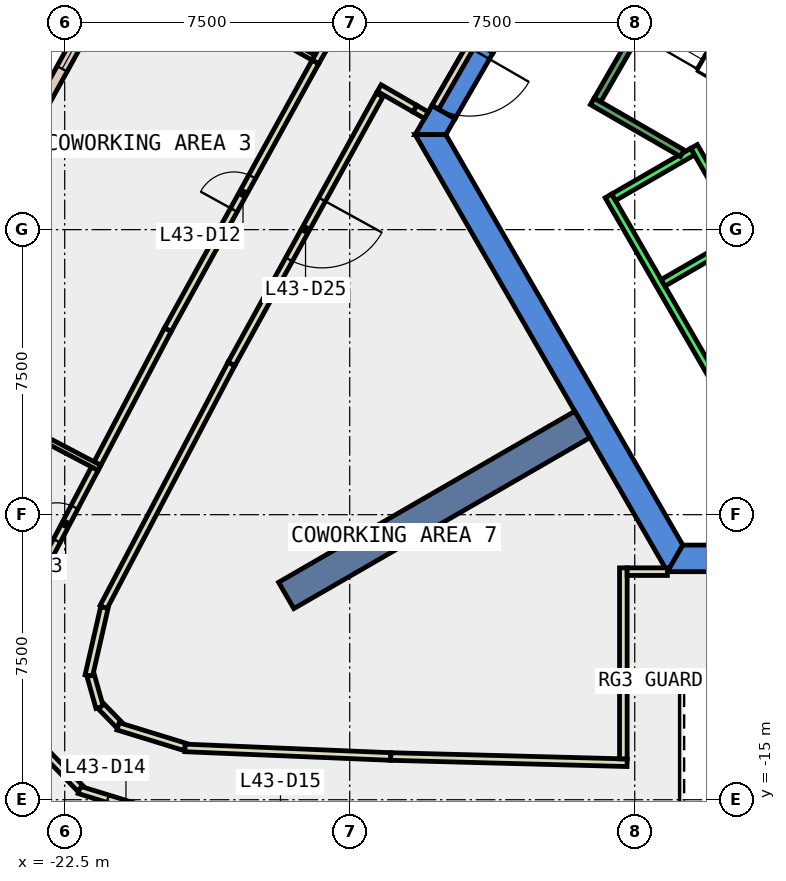
"""IFC4 building model, lengths in metres.
Left out: names, types, materials, properties, quantities, classifications, styles, units other than length and angle.
Written with IfcOpenShell. Run it as: python <this file> out.ifc"""

import sys

from ifc_helpers import new_model, si_unit, direction, frame, frame_2d, origin, place, context, subcontext, project, spatial, polyline, rectangle, outline, extrude, element, fill, save


model = new_model("IFC4")
c1 = context("Model", 3, precision=1e-05, world=origin(), true_north=direction((0.0, 1.0)))
c2 = subcontext(c1, "Body", "Model", "MODEL_VIEW")
j1 = project(units=[si_unit("LENGTHUNIT", "METRE"), si_unit("PLANEANGLEUNIT", "RADIAN")], contexts=[c1])
p1 = place(None, origin())
s1 = spatial("IfcSite", under=j1, at=p1, CompositionType="ELEMENT")
p2 = place(p1, origin())
s2 = spatial("IfcBuilding", under=s1, at=p2, CompositionType="ELEMENT")
p3 = place(p2, frame((0.0, 0.0, 194.0)))
s3 = spatial("IfcBuildingStorey", under=s2, at=p3, CompositionType="ELEMENT", Elevation=194.0)
p4 = place(p3, frame((0.0, 0.0, -0.4)))
e1 = element("IfcWall", 1, at=p4, inside=s3, PredefinedType="SHEAR", context=c2, shape_type="SweptSolid", body=[
    extrude(outline(polyline([(-11.834, 5.002), (-11.228, 4.652), (-6.235, 13.3), (-6.64, 14.0), (-11.834, 5.002)])), origin(), (0.0, 0.0, 1.0), 4.2),
])
p5 = place(p3, frame((0.0, 0.0, -0.4)))
e2 = element("IfcWall", 2, at=p5, inside=s3, PredefinedType="SHEAR", context=c2, shape_type="SweptSolid", body=[
    extrude(outline(polyline([(-12.228, 2.92), (-12.834, 3.27), (-13.279, 2.5), (-12.471, 2.5), (-12.228, 2.92)])), origin(), (0.0, 0.0, 1.0), 4.2),
])
p6 = place(p3, frame((0.0, 0.0, 3.6)))
e3 = element("IfcWall", 3, at=p6, inside=s3, PredefinedType="SHEAR", context=c2, shape_type="SweptSolid", body=[
    extrude(outline(polyline([(-12.834, 3.27), (-12.228, 2.92), (-11.228, 4.652), (-11.834, 5.002), (-12.834, 3.27)])), origin(), (0.0, 0.0, 1.0), 0.2),
])
p7 = place(p3, frame((0.0, 0.0, -0.4)))
e4 = element("IfcWall", 4, at=p7, inside=s3, PredefinedType="SHEAR", context=c2, shape_type="SweptSolid", body=[
    extrude(outline(polyline([(-13.279, 2.5), (-6.64, -9.0), (-6.235, -8.3), (-12.471, 2.5), (-13.279, 2.5)])), origin(), (0.0, 0.0, 1.0), 4.2),
])
p8 = place(p3, frame((0.0, 0.0, -0.4)))
e5 = element("IfcWall", 5, at=p8, inside=s3, PredefinedType="SHEAR", context=c2, shape_type="SweptSolid", body=[
    extrude(outline(polyline([(3.75, -9.0), (3.75, -8.3), (-6.235, -8.3), (-6.64, -9.0), (3.75, -9.0)])), origin(), (0.0, 0.0, 1.0), 4.2),
])
p9 = place(p3, frame((-8.877, -5.125, -0.4), z_axis=(0.0, 0.0, 1.0), x_axis=(-0.866017533419, -0.500013631625, 0.0)))
e6 = element("IfcWall", 6, at=p9, inside=s3, PredefinedType="SHEAR", context=c2, shape_type="SweptSolid", body=[
    extrude(rectangle(XDim=9.0, YDim=0.8, at=frame_2d((4.5, 0.0))), origin(), (0.0, 0.0, 1.0), 4.2),
])
p10 = place(p3, frame((-21.116, 6.865, 0.0), z_axis=(0.0, 0.0, 1.0), x_axis=(-0.482862185961, -0.875696356832, 0.0)))
e7 = element("IfcWall", 7, at=p10, inside=s3, PredefinedType="STANDARD", context=c2, shape_type="SweptSolid", body=[
    extrude(rectangle(XDim=7.23, YDim=0.3, at=frame_2d((3.615, 0.0))), origin(), (0.0, 0.0, 1.0), 3.8),
])
p11 = place(p10, frame((0.607, 0.0, 0.9)))
e8 = element("IfcOpeningElement", 8, at=p11, cuts=e7, PredefinedType="OPENING", context=c2, shape_type="SweptSolid", body=[
    extrude(rectangle(XDim=2.4, YDim=2.6, at=frame_2d((1.2, 1.3))), frame((0.0, 0.16, 0.0), z_axis=(0.0, -1.0, 0.0), x_axis=(1.0, 0.0, 0.0)), (0.0, 0.0, 1.0), 0.32),
])
p12 = place(p10, frame((4.222, 0.0, 0.9)))
e9 = element("IfcOpeningElement", 9, at=p12, cuts=e7, PredefinedType="OPENING", context=c2, shape_type="SweptSolid", body=[
    extrude(rectangle(XDim=2.4, YDim=2.6, at=frame_2d((1.2, 1.3))), frame((0.0, 0.16, 0.0), z_axis=(0.0, -1.0, 0.0), x_axis=(1.0, 0.0, 0.0)), (0.0, 0.0, 1.0), 0.32),
])
p13 = place(p3, frame((-18.112, -3.531, 0.0), z_axis=(0.0, 0.0, 1.0), x_axis=(-0.465461327558, -0.885068219149, 0.0)))
e10 = element("IfcWall", 10, at=p13, inside=s3, PredefinedType="PARTITIONING", context=c2, shape_type="SweptSolid", body=[
    extrude(rectangle(XDim=7.236, YDim=0.2, at=frame_2d((3.618, 0.0))), origin(), (0.0, 0.0, 1.0), 3.8),
])
p14 = place(p3, frame((-21.456, -9.944, 0.0), z_axis=(0.0, 0.0, 1.0), x_axis=(-0.222871656966, -0.974847795567, 0.0)))
e11 = element("IfcWall", 11, at=p14, inside=s3, PredefinedType="PARTITIONING", context=c2, shape_type="SweptSolid", body=[
    extrude(rectangle(XDim=1.839, YDim=0.2, at=frame_2d((0.919, 0.0))), origin(), (0.0, 0.0, 1.0), 3.8),
])
p15 = place(p3, frame((-21.816, -11.735, 0.0), z_axis=(0.0, 0.0, 1.0), x_axis=(0.270192443589, -0.962806337447, 0.0)))
e12 = element("IfcWall", 12, at=p15, inside=s3, PredefinedType="PARTITIONING", context=c2, shape_type="SweptSolid", body=[
    extrude(rectangle(XDim=0.869, YDim=0.2, at=frame_2d((0.435, 0.0))), origin(), (0.0, 0.0, 1.0), 3.8),
])
p16 = place(p3, frame((-21.538, -12.547, 0.0), z_axis=(0.0, 0.0, 1.0), x_axis=(0.697542638825, -0.716543276446, 0.0)))
e13 = element("IfcWall", 13, at=p16, inside=s3, PredefinedType="PARTITIONING", context=c2, shape_type="SweptSolid", body=[
    extrude(rectangle(XDim=0.668, YDim=0.2, at=frame_2d((0.334, 0.0))), origin(), (0.0, 0.0, 1.0), 3.8),
])
p17 = place(p3, frame((-21.097, -13.068, 0.0), z_axis=(0.0, 0.0, 1.0), x_axis=(0.955790442908, -0.294048685161, 0.0)))
e14 = element("IfcWall", 14, at=p17, inside=s3, PredefinedType="PARTITIONING", context=c2, shape_type="SweptSolid", body=[
    extrude(rectangle(XDim=1.846, YDim=0.2, at=frame_2d((0.923, 0.0))), origin(), (0.0, 0.0, 1.0), 3.8),
])
p18 = place(p3, frame((-19.336, -13.637, 0.0), z_axis=(0.0, 0.0, 1.0), x_axis=(0.999130261307, -0.041697972867, 0.0)))
e15 = element("IfcWall", 15, at=p18, inside=s3, PredefinedType="PARTITIONING", context=c2, shape_type="SweptSolid", body=[
    extrude(rectangle(XDim=5.422, YDim=0.2, at=frame_2d((2.711, 0.0))), origin(), (0.0, 0.0, 1.0), 3.8),
])
p19 = place(p3, frame((-13.919, -13.863, 0.0), z_axis=(0.0, 0.0, 1.0), x_axis=(0.999652206272, -0.026371698764, 0.0)))
e16 = element("IfcWall", 16, at=p19, inside=s3, PredefinedType="PARTITIONING", context=c2, shape_type="SweptSolid", body=[
    extrude(rectangle(XDim=6.221, YDim=0.2, at=frame_2d((3.111, 0.0))), origin(), (0.0, 0.0, 1.0), 3.8),
])
p20 = place(p3, frame((-12.984, 3.01, 0.0), z_axis=(0.0, 0.0, 1.0), x_axis=(-0.866046247233, 0.49996389635, 0.0)))
e17 = element("IfcWall", 17, at=p20, inside=s3, PredefinedType="PARTITIONING", context=c2, shape_type="SweptSolid", body=[
    extrude(rectangle(XDim=0.35, YDim=0.2, at=frame_2d((0.175, 0.0))), origin(), (0.0, 0.0, 1.0), 2.4),
])
p21 = place(p3, frame((-14.213, 3.543, 0.0), z_axis=(0.0, 0.0, 1.0), x_axis=(-0.482724934882, -0.875772023556, 0.0)))
e18 = element("IfcWall", 18, at=p21, inside=s3, PredefinedType="PARTITIONING", context=c2, shape_type="SweptSolid", body=[
    extrude(rectangle(XDim=8.077, YDim=0.2, at=frame_2d((4.039, 0.0))), origin(), (0.0, 0.0, 1.0), 3.8),
])
p22 = place(p21, frame((3.139, 0.0, 0.0)))
e19 = element("IfcOpeningElement", 19, at=p22, cuts=e18, PredefinedType="OPENING", context=c2, shape_type="SweptSolid", body=[
    extrude(rectangle(XDim=1.8, YDim=2.1, at=frame_2d((0.9, 1.05))), frame((0.0, 0.11, 0.0), z_axis=(0.0, -1.0, 0.0), x_axis=(1.0, 0.0, 0.0)), (0.0, 0.0, 1.0), 0.22),
])
p23 = place(p3, frame((-15.905, 4.412, 0.0), z_axis=(0.0, 0.0, 1.0), x_axis=(0.5000098125, 0.866019738461, 0.0)))
e20 = element("IfcWall", 20, at=p23, inside=s3, PredefinedType="PARTITIONING", context=c2, shape_type="SweptSolid", body=[
    extrude(rectangle(XDim=8.188, YDim=0.2, at=frame_2d((4.094, 0.0))), origin(), (0.0, 0.0, 1.0), 3.8),
])
p24 = place(p23, frame((3.594, 0.0, 0.0)))
e21 = element("IfcOpeningElement", 21, at=p24, cuts=e20, PredefinedType="OPENING", context=c2, shape_type="SweptSolid", body=[
    extrude(rectangle(XDim=1.0, YDim=2.1, at=frame_2d((0.5, 1.05))), frame((0.0, 0.11, 0.0), z_axis=(0.0, -1.0, 0.0), x_axis=(1.0, 0.0, 0.0)), (0.0, 0.0, 1.0), 0.22),
])
p25 = place(p3, frame((-21.638, -6.154, 0.0), z_axis=(0.0, 0.0, 1.0), x_axis=(0.465392595139, 0.885104362428, 0.0)))
e22 = element("IfcWall", 22, at=p25, inside=s3, PredefinedType="PARTITIONING", context=c2, shape_type="SweptSolid", body=[
    extrude(rectangle(XDim=3.982, YDim=0.2, at=frame_2d((1.991, 0.0))), origin(), (0.0, 0.0, 1.0), 3.8),
])
p26 = place(p3, frame((-19.785, -2.63, 0.0), z_axis=(0.0, 0.0, 1.0), x_axis=(0.482817232578, 0.875721142788, 0.0)))
e23 = element("IfcWall", 23, at=p26, inside=s3, PredefinedType="PARTITIONING", context=c2, shape_type="SweptSolid", body=[
    extrude(rectangle(XDim=8.04, YDim=0.2, at=frame_2d((4.02, 0.0))), origin(), (0.0, 0.0, 1.0), 3.8),
])
p27 = place(p26, frame((3.595, 0.0, 0.0)))
e24 = element("IfcOpeningElement", 24, at=p27, cuts=e23, PredefinedType="OPENING", context=c2, shape_type="SweptSolid", body=[
    extrude(rectangle(XDim=1.0, YDim=2.1, at=frame_2d((0.5, 1.05))), frame((0.0, 0.11, 0.0), z_axis=(0.0, -1.0, 0.0), x_axis=(1.0, 0.0, 0.0)), (0.0, 0.0, 1.0), 0.22),
])
p28 = place(p3, frame((-23.242, -9.204, 0.0), z_axis=(0.0, 0.0, 1.0), x_axis=(0.465431933571, 0.885083676955, 0.0)))
e25 = element("IfcWall", 25, at=p28, inside=s3, PredefinedType="PARTITIONING", context=c2, shape_type="SweptSolid", body=[
    extrude(rectangle(XDim=3.296, YDim=0.2, at=frame_2d((1.648, 0.0))), origin(), (0.0, 0.0, 1.0), 3.8),
])
p29 = place(p28, frame((1.148, 0.0, 0.0)))
e26 = element("IfcOpeningElement", 26, at=p29, cuts=e25, PredefinedType="OPENING", context=c2, shape_type="SweptSolid", body=[
    extrude(rectangle(XDim=1.0, YDim=2.1, at=frame_2d((0.5, 1.05))), frame((0.0, 0.11, 0.0), z_axis=(0.0, -1.0, 0.0), x_axis=(1.0, 0.0, 0.0)), (0.0, 0.0, 1.0), 0.22),
])
p30 = place(p3, frame((-19.657, -15.5, 0.0), z_axis=(0.0, 0.0, 1.0), x_axis=(-0.955612889251, 0.294625195625, 0.0)))
e27 = element("IfcWall", 27, at=p30, inside=s3, PredefinedType="PARTITIONING", context=c2, shape_type="SweptSolid", body=[
    extrude(rectangle(XDim=2.576, YDim=0.2, at=frame_2d((1.288, 0.0))), origin(), (0.0, 0.0, 1.0), 3.8),
])
p31 = place(p30, frame((0.788, 0.0, 0.0)))
e28 = element("IfcOpeningElement", 28, at=p31, cuts=e27, PredefinedType="OPENING", context=c2, shape_type="SweptSolid", body=[
    extrude(rectangle(XDim=1.0, YDim=2.1, at=frame_2d((0.5, 1.05))), frame((0.0, 0.11, 0.0), z_axis=(0.0, -1.0, 0.0), x_axis=(1.0, 0.0, 0.0)), (0.0, 0.0, 1.0), 0.22),
])
p32 = place(p3, frame((-22.093, -14.699, 0.0), z_axis=(0.0, 0.0, 1.0), x_axis=(-0.698551276451, 0.715560000397, 0.0)))
e29 = element("IfcWall", 29, at=p32, inside=s3, PredefinedType="PARTITIONING", context=c2, shape_type="SweptSolid", body=[
    extrude(rectangle(XDim=1.636, YDim=0.2, at=frame_2d((0.818, 0.0))), origin(), (0.0, 0.0, 1.0), 3.8),
])
p33 = place(p3, frame((-7.8, -13.924, 0.0), z_axis=(0.0, 0.0, 1.0), x_axis=(0.0, 1.0, 0.0)))
e30 = element("IfcWall", 30, at=p33, inside=s3, PredefinedType="PARTITIONING", context=c2, shape_type="SweptSolid", body=[
    extrude(rectangle(XDim=5.025, YDim=0.2, at=frame_2d((2.513, 0.0))), origin(), (0.0, 0.0, 1.0), 3.8),
])
p34 = place(p3, frame((-7.7, -8.999, 0.0), z_axis=(0.0, 0.0, 1.0), x_axis=(1.0, 0.0, 0.0)))
e31 = element("IfcWall", 31, at=p34, inside=s3, PredefinedType="PARTITIONING", context=c2, shape_type="SweptSolid", body=[
    extrude(rectangle(XDim=1.059, YDim=0.2, at=frame_2d((0.529, 0.0))), origin(), (0.0, 0.0, 1.0), 3.8),
])
p35 = place(p3, frame((-15.954, 4.526, 0.0), z_axis=(0.0, 0.0, 1.0), x_axis=(-0.870940016277, 0.491389344663, 0.0)))
e32 = element("IfcWall", 32, at=p35, inside=s3, PredefinedType="PARTITIONING", context=c2, shape_type="SweptSolid", body=[
    extrude(rectangle(XDim=4.18, YDim=0.15, at=frame_2d((2.09, 0.0))), origin(), (0.0, 0.0, 1.0), 3.8),
])
p36 = place(p3, frame((-21.585, -6.267, 0.0), z_axis=(0.0, 0.0, 1.0), x_axis=(-0.885073333504, 0.465451602554, 0.0)))
e33 = element("IfcWall", 33, at=p36, inside=s3, PredefinedType="PARTITIONING", context=c2, shape_type="SweptSolid", body=[
    extrude(rectangle(XDim=5.7, YDim=0.15, at=frame_2d((2.85, 0.0))), origin(), (0.0, 0.0, 1.0), 3.8),
])
p37 = place(p3, frame((-11.747, 4.952, 0.0), z_axis=(0.0, 0.0, 1.0), x_axis=(-0.50002537861, -0.866010750942, 0.0)))
e34 = element("IfcWall", 34, at=p37, inside=s3, PredefinedType="PARTITIONING", context=c2, shape_type="SweptSolid", body=[
    extrude(rectangle(XDim=2.0, YDim=0.2, at=frame_2d((1.0, 0.0))), origin(), (0.0, 0.0, 1.0), 2.4),
])
p38 = place(p37, frame((0.19, 0.0, 0.0)))
e35 = element("IfcOpeningElement", 35, at=p38, cuts=e34, PredefinedType="OPENING", context=c2, shape_type="SweptSolid", body=[
    extrude(rectangle(XDim=1.8, YDim=2.1, at=frame_2d((0.9, 1.05))), frame((0.0, 0.11, 0.0), z_axis=(0.0, -1.0, 0.0), x_axis=(1.0, 0.0, 0.0)), (0.0, 0.0, 1.0), 0.22),
])
p39 = place(p3, frame((-13.287, 3.185, 0.0), z_axis=(0.0, 0.0, 1.0), x_axis=(-0.866121626761, 0.499833299868, 0.0)))
e36 = element("IfcWall", 36, at=p39, inside=s3, PredefinedType="PARTITIONING", context=c2, shape_type="SweptSolid", body=[
    extrude(rectangle(XDim=1.08, YDim=0.2, at=frame_2d((0.54, 0.0))), origin(), (0.0, 0.0, 1.0), 3.8),
])
p40 = place(p3, frame((-5.94, 2.188, 0.0), z_axis=(0.0, 0.0, 1.0), x_axis=(0.500034260056, -0.866005622828, 0.0)))
e37 = element("IfcWall", 37, at=p40, inside=s3, PredefinedType="STANDARD", context=c2, shape_type="SweptSolid", body=[
    extrude(rectangle(XDim=5.399, YDim=0.2, at=frame_2d((2.7, 0.0))), origin(), (0.0, 0.0, 1.0), 3.8),
])
p41 = place(p40, frame((3.075, 0.0, 0.0)))
e38 = element("IfcOpeningElement", 38, at=p41, cuts=e37, PredefinedType="OPENING", context=c2, shape_type="SweptSolid", body=[
    extrude(rectangle(XDim=1.1, YDim=2.1, at=frame_2d((0.55, 1.05))), frame((0.0, 0.11, 0.0), z_axis=(0.0, -1.0, 0.0), x_axis=(1.0, 0.0, 0.0)), (0.0, 0.0, 1.0), 0.22),
])
p42 = place(p40, frame((1.225, 0.0, 0.0)))
e39 = element("IfcOpeningElement", 39, at=p42, cuts=e37, PredefinedType="OPENING", context=c2, shape_type="SweptSolid", body=[
    extrude(rectangle(XDim=1.1, YDim=2.1, at=frame_2d((0.55, 1.05))), frame((0.0, 0.11, 0.0), z_axis=(0.0, -1.0, 0.0), x_axis=(1.0, 0.0, 0.0)), (0.0, 0.0, 1.0), 0.22),
])
p43 = place(p3, frame((-8.192, 0.888, 0.0), z_axis=(0.0, 0.0, 1.0), x_axis=(0.500034260056, -0.866005622828, 0.0)))
e40 = element("IfcWall", 40, at=p43, inside=s3, PredefinedType="STANDARD", context=c2, shape_type="SweptSolid", body=[
    extrude(rectangle(XDim=5.399, YDim=0.2, at=frame_2d((2.7, 0.0))), origin(), (0.0, 0.0, 1.0), 3.8),
])
for number, where, z_axis, x_axis in (
    (41, (-5.977, 2.052, 0.0), (0.0, 0.0, 1.0), (-0.866, -0.5, 0.0)),
    (42, (-4.677, -0.2, 0.0), (0.0, 0.0, 1.0), (-0.866, -0.5, 0.0)),
):
    element("IfcWall", number, at=place(p3, frame(where, z_axis=z_axis, x_axis=x_axis)), inside=s3, PredefinedType="STANDARD", context=c2, shape_type="SweptSolid", body=[
        extrude(rectangle(XDim=2.399, YDim=0.2, at=frame_2d((1.2, 0.0))), origin(), (0.0, 0.0, 1.0), 3.8),
    ])
p44 = place(p3, frame((-6.25, 2.01, 0.0), z_axis=(0.0, 0.0, 1.0), x_axis=(-0.86611865017, 0.499838457731, 0.0)))
e43 = element("IfcWall", 43, at=p44, inside=s3, PredefinedType="STANDARD", context=c2, shape_type="SweptSolid", body=[
    extrude(rectangle(XDim=2.733, YDim=0.2, at=frame_2d((1.366, 0.0))), origin(), (0.0, 0.0, 1.0), 3.8),
])
p45 = place(p3, frame((-5.03, 9.388, 0.0), z_axis=(0.0, 0.0, 1.0), x_axis=(-0.499978703459, -0.866037698999, 0.0)))
e44 = element("IfcWall", 44, at=p45, inside=s3, PredefinedType="STANDARD", context=c2, shape_type="SweptSolid", body=[
    extrude(rectangle(XDim=6.9, YDim=0.2, at=frame_2d((3.45, 0.0))), origin(), (0.0, 0.0, 1.0), 3.8),
])
p46 = place(p11, origin())
e45 = element("IfcWindow", 45, at=p46, inside=s3, PartitioningType="SINGLE_PANEL", PredefinedType="WINDOW", context=c2, shape_type="SweptSolid", body=[
    extrude(rectangle(XDim=2.4, YDim=2.6, at=frame_2d((1.2, 1.3))), frame((0.0, 0.03, 0.0), z_axis=(0.0, -1.0, 0.0), x_axis=(1.0, 0.0, 0.0)), (0.0, 0.0, 1.0), 0.06),
])
fill(e8, e45)
p47 = place(p27, origin())
e46 = element("IfcDoor", 46, at=p47, inside=s3, OperationType="SINGLE_SWING_LEFT", PredefinedType="DOOR", context=c2, shape_type="SweptSolid", body=[
    extrude(rectangle(XDim=1.0, YDim=2.1, at=frame_2d((0.5, 1.05))), frame((0.0, 0.025, 0.0), z_axis=(0.0, -1.0, 0.0), x_axis=(1.0, 0.0, 0.0)), (0.0, 0.0, 1.0), 0.05),
])
fill(e24, e46)
p48 = place(p29, origin())
e47 = element("IfcDoor", 47, at=p48, inside=s3, OperationType="SINGLE_SWING_RIGHT", PredefinedType="DOOR", context=c2, shape_type="SweptSolid", body=[
    extrude(rectangle(XDim=1.0, YDim=2.1, at=frame_2d((0.5, 1.05))), frame((0.0, 0.025, 0.0), z_axis=(0.0, -1.0, 0.0), x_axis=(1.0, 0.0, 0.0)), (0.0, 0.0, 1.0), 0.05),
])
fill(e26, e47)
p49 = place(p31, origin())
e48 = element("IfcDoor", 48, at=p49, inside=s3, OperationType="SINGLE_SWING_LEFT", PredefinedType="DOOR", context=c2, shape_type="SweptSolid", body=[
    extrude(rectangle(XDim=1.0, YDim=2.1, at=frame_2d((0.5, 1.05))), frame((0.0, 0.025, 0.0), z_axis=(0.0, -1.0, 0.0), x_axis=(1.0, 0.0, 0.0)), (0.0, 0.0, 1.0), 0.05),
])
fill(e28, e48)
p50 = place(p22, origin())
e49 = element("IfcDoor", 49, at=p50, inside=s3, OperationType="DOUBLE_DOOR_SINGLE_SWING", PredefinedType="DOOR", context=c2, shape_type="SweptSolid", body=[
    extrude(rectangle(XDim=1.8, YDim=2.1, at=frame_2d((0.9, 1.05))), frame((0.0, 0.025, 0.0), z_axis=(0.0, -1.0, 0.0), x_axis=(1.0, 0.0, 0.0)), (0.0, 0.0, 1.0), 0.05),
])
fill(e19, e49)
p51 = place(p38, origin())
e50 = element("IfcDoor", 50, at=p51, inside=s3, OperationType="DOUBLE_DOOR_SINGLE_SWING", PredefinedType="DOOR", context=c2, shape_type="SweptSolid", body=[
    extrude(rectangle(XDim=1.8, YDim=2.1, at=frame_2d((0.9, 1.05))), frame((0.0, 0.025, 0.0), z_axis=(0.0, -1.0, 0.0), x_axis=(1.0, 0.0, 0.0)), (0.0, 0.0, 1.0), 0.05),
])
fill(e35, e50)
save(model, sys.argv[1])
